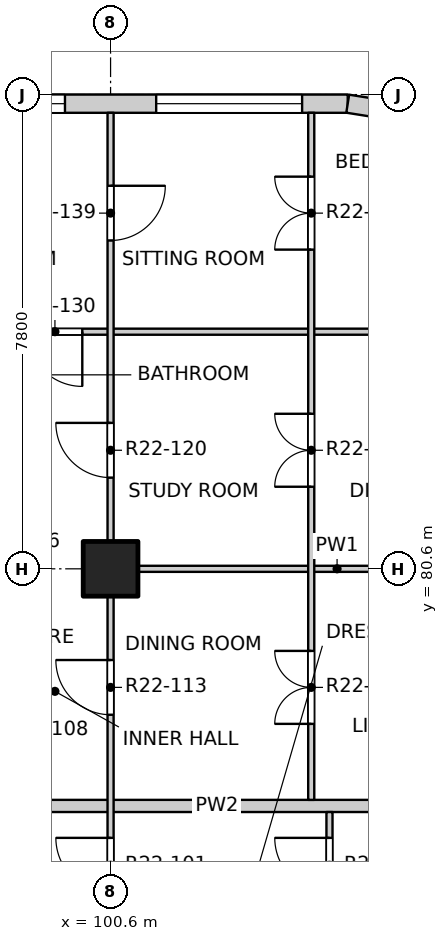
"""IFC4 building model, lengths in metres.
Left out: names, types, materials, properties, quantities, classifications, styles, units other than length and angle.
Written with IfcOpenShell. Run it as: python <this file> out.ifc"""

import sys

from ifc_helpers import new_model, si_unit, direction, frame, frame_2d, origin, origin_2d, place, context, subcontext, project, spatial, rectangle, extrude, element, fill, save


model = new_model("IFC4")
c1 = context("Model", 3, precision=1e-05, world=origin(), true_north=direction((0.0, 1.0)))
c2 = subcontext(c1, "Body", "Model", "MODEL_VIEW")
j1 = project(units=[si_unit("LENGTHUNIT", "METRE"), si_unit("PLANEANGLEUNIT", "RADIAN")], contexts=[c1])
p1 = place(None, origin())
s1 = spatial("IfcSite", under=j1, at=p1, CompositionType="ELEMENT")
p2 = place(p1, origin())
s2 = spatial("IfcBuilding", under=s1, at=p2, CompositionType="ELEMENT")
p3 = place(p2, frame((0.0, 0.0, 231.3)))
s3 = spatial("IfcBuildingStorey", under=s2, at=p3, CompositionType="ELEMENT", Elevation=231.3)
p4 = place(p3, frame((100.6, 80.6, -0.25), z_axis=(0.0, 0.0, 1.0), x_axis=(1.0, 0.0, 0.0)))
e1 = element("IfcColumn", 1, at=p4, inside=s3, PredefinedType="COLUMN", context=c2, shape_type="SweptSolid", body=[
    extrude(rectangle(XDim=0.9, YDim=0.9, at=origin_2d()), origin(), (0.0, 0.0, 1.0), 3.4),
])
p5 = place(p3, frame((97.1, 88.25, 0.0), z_axis=(0.0, 0.0, 1.0), x_axis=(1.0, 0.0, 0.0)))
e2 = element("IfcWall", 2, at=p5, inside=s3, PredefinedType="SOLIDWALL", context=c2, shape_type="SweptSolid", body=[
    extrude(rectangle(XDim=7.4, YDim=0.3, at=frame_2d((3.7, 0.0))), origin(), (0.0, 0.0, 1.0), 2.7),
])
p6 = place(p5, frame((0.35, 0.0, 0.9)))
e3 = element("IfcOpeningElement", 3, at=p6, cuts=e2, PredefinedType="OPENING", context=c2, shape_type="SweptSolid", body=[
    extrude(rectangle(XDim=2.4, YDim=1.8, at=frame_2d((1.2, 0.9))), frame((0.0, 0.16, 0.0), z_axis=(0.0, -1.0, 0.0), x_axis=(1.0, 0.0, 0.0)), (0.0, 0.0, 1.0), 0.32),
])
p7 = place(p5, frame((4.25, 0.0, 0.9)))
e4 = element("IfcOpeningElement", 4, at=p7, cuts=e2, PredefinedType="OPENING", context=c2, shape_type="SweptSolid", body=[
    extrude(rectangle(XDim=2.4, YDim=1.8, at=frame_2d((1.2, 0.9))), frame((0.0, 0.16, 0.0), z_axis=(0.0, -1.0, 0.0), x_axis=(1.0, 0.0, 0.0)), (0.0, 0.0, 1.0), 0.32),
])
p8 = place(p3, frame((105.659, 88.066, 0.0), z_axis=(0.0, 0.0, 1.0), x_axis=(-0.987678452879, 0.156496880861, 0.0)))
e5 = element("IfcWall", 5, at=p8, inside=s3, PredefinedType="SOLIDWALL", context=c2, shape_type="SweptSolid", body=[
    extrude(rectangle(XDim=1.173, YDim=0.3, at=frame_2d((0.586, 0.0))), origin(), (0.0, 0.0, 1.0), 2.7),
])
p9 = place(p3, frame((96.6, 76.7, 0.0), z_axis=(0.0, 0.0, 1.0), x_axis=(1.0, 0.0, 0.0)))
e6 = element("IfcWall", 6, at=p9, inside=s3, PredefinedType="PARTITIONING", context=c2, shape_type="SweptSolid", body=[
    extrude(rectangle(XDim=11.5, YDim=0.2, at=frame_2d((5.75, 0.0))), origin(), (0.0, 0.0, 1.0), 2.55),
])
p10 = place(p3, frame((100.55, 80.6, 0.0), z_axis=(0.0, 0.0, 1.0), x_axis=(1.0, 0.0, 0.0)))
e7 = element("IfcWall", 7, at=p10, inside=s3, PredefinedType="PARTITIONING", context=c2, shape_type="SweptSolid", body=[
    extrude(rectangle(XDim=7.55, YDim=0.1, at=frame_2d((3.775, 0.0))), origin(), (0.0, 0.0, 1.0), 3.15),
])
p11 = place(p3, frame((96.6, 84.5, 0.0), z_axis=(0.0, 0.0, 1.0), x_axis=(1.0, 0.0, 0.0)))
e8 = element("IfcWall", 8, at=p11, inside=s3, PredefinedType="PARTITIONING", context=c2, shape_type="SweptSolid", body=[
    extrude(rectangle(XDim=11.5, YDim=0.1, at=frame_2d((5.75, 0.0))), origin(), (0.0, 0.0, 1.0), 3.15),
])
p12 = place(p11, frame((2.635, 0.0, 0.0)))
e9 = element("IfcOpeningElement", 9, at=p12, cuts=e8, PredefinedType="OPENING", context=c2, shape_type="SweptSolid", body=[
    extrude(rectangle(XDim=0.9, YDim=2.1, at=frame_2d((0.45, 1.05))), frame((0.0, 0.06, 0.0), z_axis=(0.0, -1.0, 0.0), x_axis=(1.0, 0.0, 0.0)), (0.0, 0.0, 1.0), 0.12),
])
p13 = place(p3, frame((100.6, 41.9, 0.0), z_axis=(0.0, 0.0, 1.0), x_axis=(0.0, 1.0, 0.0)))
e10 = element("IfcWall", 10, at=p13, inside=s3, PredefinedType="PARTITIONING", context=c2, shape_type="SweptSolid", body=[
    extrude(rectangle(XDim=46.2, YDim=0.1, at=frame_2d((23.1, 0.0))), origin(), (0.0, 0.0, 1.0), 3.15),
])
p14 = place(p13, frame((1.2, 0.0, 0.0)))
e11 = element("IfcOpeningElement", 11, at=p14, cuts=e10, PredefinedType="OPENING", context=c2, shape_type="SweptSolid", body=[
    extrude(rectangle(XDim=0.9, YDim=2.1, at=frame_2d((0.45, 1.05))), frame((0.0, 0.06, 0.0), z_axis=(0.0, -1.0, 0.0), x_axis=(1.0, 0.0, 0.0)), (0.0, 0.0, 1.0), 0.12),
])
p15 = place(p13, frame((6.025, 0.0, 0.0)))
e12 = element("IfcOpeningElement", 12, at=p15, cuts=e10, PredefinedType="OPENING", context=c2, shape_type="SweptSolid", body=[
    extrude(rectangle(XDim=0.9, YDim=2.1, at=frame_2d((0.45, 1.05))), frame((0.0, 0.06, 0.0), z_axis=(0.0, -1.0, 0.0), x_axis=(1.0, 0.0, 0.0)), (0.0, 0.0, 1.0), 0.12),
])
p16 = place(p13, frame((9.0, 0.0, 0.0)))
e13 = element("IfcOpeningElement", 13, at=p16, cuts=e10, PredefinedType="OPENING", context=c2, shape_type="SweptSolid", body=[
    extrude(rectangle(XDim=0.9, YDim=2.1, at=frame_2d((0.45, 1.05))), frame((0.0, 0.06, 0.0), z_axis=(0.0, -1.0, 0.0), x_axis=(1.0, 0.0, 0.0)), (0.0, 0.0, 1.0), 0.12),
])
p17 = place(p13, frame((12.9, 0.0, 0.0)))
e14 = element("IfcOpeningElement", 14, at=p17, cuts=e10, PredefinedType="OPENING", context=c2, shape_type="SweptSolid", body=[
    extrude(rectangle(XDim=0.9, YDim=2.1, at=frame_2d((0.45, 1.05))), frame((0.0, 0.06, 0.0), z_axis=(0.0, -1.0, 0.0), x_axis=(1.0, 0.0, 0.0)), (0.0, 0.0, 1.0), 0.12),
])
p18 = place(p13, frame((17.775, 0.0, 0.0)))
e15 = element("IfcOpeningElement", 15, at=p18, cuts=e10, PredefinedType="OPENING", context=c2, shape_type="SweptSolid", body=[
    extrude(rectangle(XDim=0.9, YDim=2.1, at=frame_2d((0.45, 1.05))), frame((0.0, 0.06, 0.0), z_axis=(0.0, -1.0, 0.0), x_axis=(1.0, 0.0, 0.0)), (0.0, 0.0, 1.0), 0.12),
])
p19 = place(p13, frame((21.625, 0.0, 0.0)))
e16 = element("IfcOpeningElement", 16, at=p19, cuts=e10, PredefinedType="OPENING", context=c2, shape_type="SweptSolid", body=[
    extrude(rectangle(XDim=0.9, YDim=2.1, at=frame_2d((0.45, 1.05))), frame((0.0, 0.06, 0.0), z_axis=(0.0, -1.0, 0.0), x_axis=(1.0, 0.0, 0.0)), (0.0, 0.0, 1.0), 0.12),
])
p20 = place(p13, frame((25.575, 0.0, 0.0)))
e17 = element("IfcOpeningElement", 17, at=p20, cuts=e10, PredefinedType="OPENING", context=c2, shape_type="SweptSolid", body=[
    extrude(rectangle(XDim=0.9, YDim=2.1, at=frame_2d((0.45, 1.05))), frame((0.0, 0.06, 0.0), z_axis=(0.0, -1.0, 0.0), x_axis=(1.0, 0.0, 0.0)), (0.0, 0.0, 1.0), 0.12),
])
p21 = place(p13, frame((28.5, 0.0, 0.0)))
e18 = element("IfcOpeningElement", 18, at=p21, cuts=e10, PredefinedType="OPENING", context=c2, shape_type="SweptSolid", body=[
    extrude(rectangle(XDim=0.9, YDim=2.1, at=frame_2d((0.45, 1.05))), frame((0.0, 0.06, 0.0), z_axis=(0.0, -1.0, 0.0), x_axis=(1.0, 0.0, 0.0)), (0.0, 0.0, 1.0), 0.12),
])
p22 = place(p13, frame((33.375, 0.0, 0.0)))
e19 = element("IfcOpeningElement", 19, at=p22, cuts=e10, PredefinedType="OPENING", context=c2, shape_type="SweptSolid", body=[
    extrude(rectangle(XDim=0.9, YDim=2.1, at=frame_2d((0.45, 1.05))), frame((0.0, 0.06, 0.0), z_axis=(0.0, -1.0, 0.0), x_axis=(1.0, 0.0, 0.0)), (0.0, 0.0, 1.0), 0.12),
])
p23 = place(p13, frame((36.3, 0.0, 0.0)))
e20 = element("IfcOpeningElement", 20, at=p23, cuts=e10, PredefinedType="OPENING", context=c2, shape_type="SweptSolid", body=[
    extrude(rectangle(XDim=0.9, YDim=2.1, at=frame_2d((0.45, 1.05))), frame((0.0, 0.06, 0.0), z_axis=(0.0, -1.0, 0.0), x_axis=(1.0, 0.0, 0.0)), (0.0, 0.0, 1.0), 0.12),
])
p24 = place(p13, frame((40.2, 0.0, 0.0)))
e21 = element("IfcOpeningElement", 21, at=p24, cuts=e10, PredefinedType="OPENING", context=c2, shape_type="SweptSolid", body=[
    extrude(rectangle(XDim=0.9, YDim=2.1, at=frame_2d((0.45, 1.05))), frame((0.0, 0.06, 0.0), z_axis=(0.0, -1.0, 0.0), x_axis=(1.0, 0.0, 0.0)), (0.0, 0.0, 1.0), 0.12),
])
p25 = place(p13, frame((44.1, 0.0, 0.0)))
e22 = element("IfcOpeningElement", 22, at=p25, cuts=e10, PredefinedType="OPENING", context=c2, shape_type="SweptSolid", body=[
    extrude(rectangle(XDim=0.9, YDim=2.1, at=frame_2d((0.45, 1.05))), frame((0.0, 0.06, 0.0), z_axis=(0.0, -1.0, 0.0), x_axis=(1.0, 0.0, 0.0)), (0.0, 0.0, 1.0), 0.12),
])
p26 = place(p3, frame((103.9, 76.8, 0.0), z_axis=(0.0, 0.0, 1.0), x_axis=(0.0, 1.0, 0.0)))
e23 = element("IfcWall", 23, at=p26, inside=s3, PredefinedType="PARTITIONING", context=c2, shape_type="SweptSolid", body=[
    extrude(rectangle(XDim=11.3, YDim=0.1, at=frame_2d((5.65, 0.0))), origin(), (0.0, 0.0, 1.0), 3.15),
])
p27 = place(p26, frame((1.25, 0.0, 0.0)))
e24 = element("IfcOpeningElement", 24, at=p27, cuts=e23, PredefinedType="OPENING", context=c2, shape_type="SweptSolid", body=[
    extrude(rectangle(XDim=1.2, YDim=2.1, at=frame_2d((0.6, 1.05))), frame((0.0, 0.06, 0.0), z_axis=(0.0, -1.0, 0.0), x_axis=(1.0, 0.0, 0.0)), (0.0, 0.0, 1.0), 0.12),
])
p28 = place(p26, frame((5.15, 0.0, 0.0)))
e25 = element("IfcOpeningElement", 25, at=p28, cuts=e23, PredefinedType="OPENING", context=c2, shape_type="SweptSolid", body=[
    extrude(rectangle(XDim=1.2, YDim=2.1, at=frame_2d((0.6, 1.05))), frame((0.0, 0.06, 0.0), z_axis=(0.0, -1.0, 0.0), x_axis=(1.0, 0.0, 0.0)), (0.0, 0.0, 1.0), 0.12),
])
p29 = place(p26, frame((9.05, 0.0, 0.0)))
e26 = element("IfcOpeningElement", 26, at=p29, cuts=e23, PredefinedType="OPENING", context=c2, shape_type="SweptSolid", body=[
    extrude(rectangle(XDim=1.2, YDim=2.1, at=frame_2d((0.6, 1.05))), frame((0.0, 0.06, 0.0), z_axis=(0.0, -1.0, 0.0), x_axis=(1.0, 0.0, 0.0)), (0.0, 0.0, 1.0), 0.12),
])
p30 = place(p3, frame((104.2, 41.9, 0.0), z_axis=(0.0, 0.0, 1.0), x_axis=(0.0, 1.0, 0.0)))
e27 = element("IfcWall", 27, at=p30, inside=s3, PredefinedType="PARTITIONING", context=c2, shape_type="SweptSolid", body=[
    extrude(rectangle(XDim=34.7, YDim=0.1, at=frame_2d((17.35, 0.0))), origin(), (0.0, 0.0, 1.0), 3.15),
])
p31 = place(p30, frame((1.05, 0.0, 0.0)))
e28 = element("IfcOpeningElement", 28, at=p31, cuts=e27, PredefinedType="OPENING", context=c2, shape_type="SweptSolid", body=[
    extrude(rectangle(XDim=1.2, YDim=2.1, at=frame_2d((0.6, 1.05))), frame((0.0, 0.06, 0.0), z_axis=(0.0, -1.0, 0.0), x_axis=(1.0, 0.0, 0.0)), (0.0, 0.0, 1.0), 0.12),
])
p32 = place(p30, frame((4.125, 0.0, 0.0)))
e29 = element("IfcOpeningElement", 29, at=p32, cuts=e27, PredefinedType="OPENING", context=c2, shape_type="SweptSolid", body=[
    extrude(rectangle(XDim=0.9, YDim=2.1, at=frame_2d((0.45, 1.05))), frame((0.0, 0.06, 0.0), z_axis=(0.0, -1.0, 0.0), x_axis=(1.0, 0.0, 0.0)), (0.0, 0.0, 1.0), 0.12),
])
p33 = place(p30, frame((6.075, 0.0, 0.0)))
e30 = element("IfcOpeningElement", 30, at=p33, cuts=e27, PredefinedType="OPENING", context=c2, shape_type="SweptSolid", body=[
    extrude(rectangle(XDim=0.9, YDim=2.1, at=frame_2d((0.45, 1.05))), frame((0.0, 0.06, 0.0), z_axis=(0.0, -1.0, 0.0), x_axis=(1.0, 0.0, 0.0)), (0.0, 0.0, 1.0), 0.12),
])
p34 = place(p30, frame((8.85, 0.0, 0.0)))
e31 = element("IfcOpeningElement", 31, at=p34, cuts=e27, PredefinedType="OPENING", context=c2, shape_type="SweptSolid", body=[
    extrude(rectangle(XDim=1.2, YDim=2.1, at=frame_2d((0.6, 1.05))), frame((0.0, 0.06, 0.0), z_axis=(0.0, -1.0, 0.0), x_axis=(1.0, 0.0, 0.0)), (0.0, 0.0, 1.0), 0.12),
])
p35 = place(p30, frame((12.75, 0.0, 0.0)))
e32 = element("IfcOpeningElement", 32, at=p35, cuts=e27, PredefinedType="OPENING", context=c2, shape_type="SweptSolid", body=[
    extrude(rectangle(XDim=1.2, YDim=2.1, at=frame_2d((0.6, 1.05))), frame((0.0, 0.06, 0.0), z_axis=(0.0, -1.0, 0.0), x_axis=(1.0, 0.0, 0.0)), (0.0, 0.0, 1.0), 0.12),
])
p36 = place(p30, frame((15.825, 0.0, 0.0)))
e33 = element("IfcOpeningElement", 33, at=p36, cuts=e27, PredefinedType="OPENING", context=c2, shape_type="SweptSolid", body=[
    extrude(rectangle(XDim=0.9, YDim=2.1, at=frame_2d((0.45, 1.05))), frame((0.0, 0.06, 0.0), z_axis=(0.0, -1.0, 0.0), x_axis=(1.0, 0.0, 0.0)), (0.0, 0.0, 1.0), 0.12),
])
p37 = place(p30, frame((17.775, 0.0, 0.0)))
e34 = element("IfcOpeningElement", 34, at=p37, cuts=e27, PredefinedType="OPENING", context=c2, shape_type="SweptSolid", body=[
    extrude(rectangle(XDim=0.9, YDim=2.1, at=frame_2d((0.45, 1.05))), frame((0.0, 0.06, 0.0), z_axis=(0.0, -1.0, 0.0), x_axis=(1.0, 0.0, 0.0)), (0.0, 0.0, 1.0), 0.12),
])
p38 = place(p30, frame((19.725, 0.0, 0.0)))
e35 = element("IfcOpeningElement", 35, at=p38, cuts=e27, PredefinedType="OPENING", context=c2, shape_type="SweptSolid", body=[
    extrude(rectangle(XDim=0.9, YDim=2.1, at=frame_2d((0.45, 1.05))), frame((0.0, 0.06, 0.0), z_axis=(0.0, -1.0, 0.0), x_axis=(1.0, 0.0, 0.0)), (0.0, 0.0, 1.0), 0.12),
])
p39 = place(p30, frame((21.675, 0.0, 0.0)))
e36 = element("IfcOpeningElement", 36, at=p39, cuts=e27, PredefinedType="OPENING", context=c2, shape_type="SweptSolid", body=[
    extrude(rectangle(XDim=0.9, YDim=2.1, at=frame_2d((0.45, 1.05))), frame((0.0, 0.06, 0.0), z_axis=(0.0, -1.0, 0.0), x_axis=(1.0, 0.0, 0.0)), (0.0, 0.0, 1.0), 0.12),
])
p40 = place(p30, frame((23.625, 0.0, 0.0)))
e37 = element("IfcOpeningElement", 37, at=p40, cuts=e27, PredefinedType="OPENING", context=c2, shape_type="SweptSolid", body=[
    extrude(rectangle(XDim=0.9, YDim=2.1, at=frame_2d((0.45, 1.05))), frame((0.0, 0.06, 0.0), z_axis=(0.0, -1.0, 0.0), x_axis=(1.0, 0.0, 0.0)), (0.0, 0.0, 1.0), 0.12),
])
p41 = place(p30, frame((25.575, 0.0, 0.0)))
e38 = element("IfcOpeningElement", 38, at=p41, cuts=e27, PredefinedType="OPENING", context=c2, shape_type="SweptSolid", body=[
    extrude(rectangle(XDim=0.9, YDim=2.1, at=frame_2d((0.45, 1.05))), frame((0.0, 0.06, 0.0), z_axis=(0.0, -1.0, 0.0), x_axis=(1.0, 0.0, 0.0)), (0.0, 0.0, 1.0), 0.12),
])
p42 = place(p30, frame((28.35, 0.0, 0.0)))
e39 = element("IfcOpeningElement", 39, at=p42, cuts=e27, PredefinedType="OPENING", context=c2, shape_type="SweptSolid", body=[
    extrude(rectangle(XDim=1.2, YDim=2.1, at=frame_2d((0.6, 1.05))), frame((0.0, 0.06, 0.0), z_axis=(0.0, -1.0, 0.0), x_axis=(1.0, 0.0, 0.0)), (0.0, 0.0, 1.0), 0.12),
])
p43 = place(p30, frame((31.425, 0.0, 0.0)))
e40 = element("IfcOpeningElement", 40, at=p43, cuts=e27, PredefinedType="OPENING", context=c2, shape_type="SweptSolid", body=[
    extrude(rectangle(XDim=0.9, YDim=2.1, at=frame_2d((0.45, 1.05))), frame((0.0, 0.06, 0.0), z_axis=(0.0, -1.0, 0.0), x_axis=(1.0, 0.0, 0.0)), (0.0, 0.0, 1.0), 0.12),
])
p44 = place(p30, frame((33.375, 0.0, 0.0)))
e41 = element("IfcOpeningElement", 41, at=p44, cuts=e27, PredefinedType="OPENING", context=c2, shape_type="SweptSolid", body=[
    extrude(rectangle(XDim=0.9, YDim=2.1, at=frame_2d((0.45, 1.05))), frame((0.0, 0.06, 0.0), z_axis=(0.0, -1.0, 0.0), x_axis=(1.0, 0.0, 0.0)), (0.0, 0.0, 1.0), 0.12),
])
p45 = place(p6, origin())
e42 = element("IfcWindow", 42, at=p45, inside=s3, PartitioningType="DOUBLE_PANEL_VERTICAL", PredefinedType="WINDOW", context=c2, shape_type="SweptSolid", body=[
    extrude(rectangle(XDim=2.4, YDim=1.8, at=frame_2d((1.2, 0.9))), frame((0.0, 0.03, 0.0), z_axis=(0.0, -1.0, 0.0), x_axis=(1.0, 0.0, 0.0)), (0.0, 0.0, 1.0), 0.06),
])
fill(e3, e42)
p46 = place(p7, origin())
e43 = element("IfcWindow", 43, at=p46, inside=s3, PartitioningType="DOUBLE_PANEL_VERTICAL", PredefinedType="WINDOW", context=c2, shape_type="SweptSolid", body=[
    extrude(rectangle(XDim=2.4, YDim=1.8, at=frame_2d((1.2, 0.9))), frame((0.0, 0.03, 0.0), z_axis=(0.0, -1.0, 0.0), x_axis=(1.0, 0.0, 0.0)), (0.0, 0.0, 1.0), 0.06),
])
fill(e4, e43)
p47 = place(p22, origin())
e44 = element("IfcDoor", 44, at=p47, inside=s3, OperationType="SINGLE_SWING_RIGHT", PredefinedType="DOOR", context=c2, shape_type="SweptSolid", body=[
    extrude(rectangle(XDim=0.9, YDim=2.1, at=frame_2d((0.45, 1.05))), frame((0.0, 0.025, 0.0), z_axis=(0.0, -1.0, 0.0), x_axis=(1.0, 0.0, 0.0)), (0.0, 0.0, 1.0), 0.05),
])
fill(e19, e44)
p48 = place(p44, origin())
e45 = element("IfcDoor", 45, at=p48, inside=s3, OperationType="SINGLE_SWING_RIGHT", PredefinedType="DOOR", context=c2, shape_type="SweptSolid", body=[
    extrude(rectangle(XDim=0.9, YDim=2.1, at=frame_2d((0.45, 1.05))), frame((0.0, 0.025, 0.0), z_axis=(0.0, -1.0, 0.0), x_axis=(1.0, 0.0, 0.0)), (0.0, 0.0, 1.0), 0.05),
])
fill(e41, e45)
p49 = place(p23, origin())
e46 = element("IfcDoor", 46, at=p49, inside=s3, OperationType="SINGLE_SWING_RIGHT", PredefinedType="DOOR", context=c2, shape_type="SweptSolid", body=[
    extrude(rectangle(XDim=0.9, YDim=2.1, at=frame_2d((0.45, 1.05))), frame((0.0, 0.025, 0.0), z_axis=(0.0, -1.0, 0.0), x_axis=(1.0, 0.0, 0.0)), (0.0, 0.0, 1.0), 0.05),
])
fill(e20, e46)
p50 = place(p27, origin())
e47 = element("IfcDoor", 47, at=p50, inside=s3, OperationType="DOUBLE_DOOR_SINGLE_SWING", PredefinedType="DOOR", context=c2, shape_type="SweptSolid", body=[
    extrude(rectangle(XDim=1.2, YDim=2.1, at=frame_2d((0.6, 1.05))), frame((0.0, 0.025, 0.0), z_axis=(0.0, -1.0, 0.0), x_axis=(1.0, 0.0, 0.0)), (0.0, 0.0, 1.0), 0.05),
])
fill(e24, e47)
p51 = place(p24, origin())
e48 = element("IfcDoor", 48, at=p51, inside=s3, OperationType="SINGLE_SWING_RIGHT", PredefinedType="DOOR", context=c2, shape_type="SweptSolid", body=[
    extrude(rectangle(XDim=0.9, YDim=2.1, at=frame_2d((0.45, 1.05))), frame((0.0, 0.025, 0.0), z_axis=(0.0, -1.0, 0.0), x_axis=(1.0, 0.0, 0.0)), (0.0, 0.0, 1.0), 0.05),
])
fill(e21, e48)
p52 = place(p28, origin())
e49 = element("IfcDoor", 49, at=p52, inside=s3, OperationType="DOUBLE_DOOR_SINGLE_SWING", PredefinedType="DOOR", context=c2, shape_type="SweptSolid", body=[
    extrude(rectangle(XDim=1.2, YDim=2.1, at=frame_2d((0.6, 1.05))), frame((0.0, 0.025, 0.0), z_axis=(0.0, -1.0, 0.0), x_axis=(1.0, 0.0, 0.0)), (0.0, 0.0, 1.0), 0.05),
])
fill(e25, e49)
p53 = place(p12, origin())
e50 = element("IfcDoor", 50, at=p53, inside=s3, OperationType="SINGLE_SWING_LEFT", PredefinedType="DOOR", context=c2, shape_type="SweptSolid", body=[
    extrude(rectangle(XDim=0.9, YDim=2.1, at=frame_2d((0.45, 1.05))), frame((0.0, 0.025, 0.0), z_axis=(0.0, -1.0, 0.0), x_axis=(1.0, 0.0, 0.0)), (0.0, 0.0, 1.0), 0.05),
])
fill(e9, e50)
p54 = place(p25, origin())
e51 = element("IfcDoor", 51, at=p54, inside=s3, OperationType="SINGLE_SWING_LEFT", PredefinedType="DOOR", context=c2, shape_type="SweptSolid", body=[
    extrude(rectangle(XDim=0.9, YDim=2.1, at=frame_2d((0.45, 1.05))), frame((0.0, 0.025, 0.0), z_axis=(0.0, -1.0, 0.0), x_axis=(1.0, 0.0, 0.0)), (0.0, 0.0, 1.0), 0.05),
])
fill(e22, e51)
p55 = place(p29, origin())
e52 = element("IfcDoor", 52, at=p55, inside=s3, OperationType="DOUBLE_DOOR_SINGLE_SWING", PredefinedType="DOOR", context=c2, shape_type="SweptSolid", body=[
    extrude(rectangle(XDim=1.2, YDim=2.1, at=frame_2d((0.6, 1.05))), frame((0.0, 0.025, 0.0), z_axis=(0.0, -1.0, 0.0), x_axis=(1.0, 0.0, 0.0)), (0.0, 0.0, 1.0), 0.05),
])
fill(e26, e52)
save(model, sys.argv[1])
